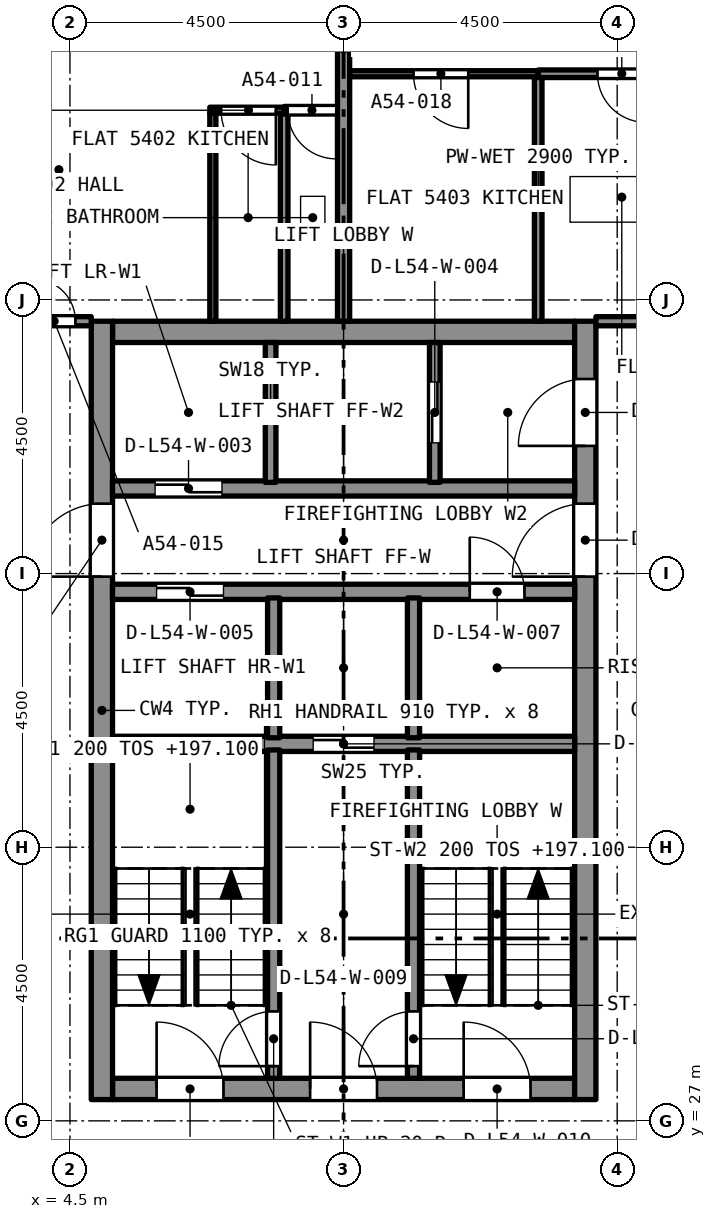
"""IFC4 building model, lengths in metres.
Left out: names, types, materials, properties, quantities, classifications, styles, units other than length and angle.
Written with IfcOpenShell. Run it as: python <this file> out.ifc"""

import sys

from ifc_helpers import new_model, si_unit, direction, frame, frame_2d, origin, place, context, subcontext, project, spatial, rectangle, extrude, element, fill, save


model = new_model("IFC4")
c1 = context("Model", 3, precision=1e-05, world=origin(), true_north=direction((0.0, 1.0)))
c2 = subcontext(c1, "Body", "Model", "MODEL_VIEW")
j1 = project(units=[si_unit("LENGTHUNIT", "METRE"), si_unit("PLANEANGLEUNIT", "RADIAN")], contexts=[c1])
p1 = place(None, origin())
s1 = spatial("IfcSite", under=j1, at=p1, CompositionType="ELEMENT")
p2 = place(p1, origin())
s2 = spatial("IfcBuilding", under=s1, at=p2, CompositionType="ELEMENT")
p3 = place(p2, frame((0.0, 0.0, 195.5)))
s3 = spatial("IfcBuildingStorey", under=s2, at=p3, CompositionType="ELEMENT", Elevation=195.5)
p4 = place(p3, frame((5.2, 27.525, 0.0), z_axis=(0.0, 0.0, 1.0), x_axis=(1.0, 0.0, 0.0)))
e1 = element("IfcWall", 1, at=p4, inside=s3, PredefinedType="SOLIDWALL", context=c2, shape_type="SweptSolid", body=[
    extrude(rectangle(XDim=7.6, YDim=0.35, at=frame_2d((3.8, 0.0))), origin(), (0.0, 0.0, 1.0), 3.2),
])
p5 = place(p4, frame((0.725, 0.0, 0.0)))
e2 = element("IfcOpeningElement", 2, at=p5, cuts=e1, PredefinedType="OPENING", context=c2, shape_type="SweptSolid", body=[
    extrude(rectangle(XDim=1.1, YDim=2.1, at=frame_2d((0.55, 1.05))), frame((0.0, 0.185, 0.0), z_axis=(0.0, -1.0, 0.0), x_axis=(1.0, 0.0, 0.0)), (0.0, 0.0, 1.0), 0.37),
])
p6 = place(p4, frame((3.25, 0.0, 0.0)))
e3 = element("IfcOpeningElement", 3, at=p6, cuts=e1, PredefinedType="OPENING", context=c2, shape_type="SweptSolid", body=[
    extrude(rectangle(XDim=1.1, YDim=2.1, at=frame_2d((0.55, 1.05))), frame((0.0, 0.185, 0.0), z_axis=(0.0, -1.0, 0.0), x_axis=(1.0, 0.0, 0.0)), (0.0, 0.0, 1.0), 0.37),
])
p7 = place(p4, frame((5.775, 0.0, 0.0)))
e4 = element("IfcOpeningElement", 4, at=p7, cuts=e1, PredefinedType="OPENING", context=c2, shape_type="SweptSolid", body=[
    extrude(rectangle(XDim=1.1, YDim=2.1, at=frame_2d((0.55, 1.05))), frame((0.0, 0.185, 0.0), z_axis=(0.0, -1.0, 0.0), x_axis=(1.0, 0.0, 0.0)), (0.0, 0.0, 1.0), 0.37),
])
p8 = place(p3, frame((5.2, 39.975, 0.0), z_axis=(0.0, 0.0, 1.0), x_axis=(1.0, 0.0, 0.0)))
e5 = element("IfcWall", 5, at=p8, inside=s3, PredefinedType="SOLIDWALL", context=c2, shape_type="SweptSolid", body=[
    extrude(rectangle(XDim=7.6, YDim=0.35, at=frame_2d((3.8, 0.0))), origin(), (0.0, 0.0, 1.0), 3.2),
])
p9 = place(p3, frame((5.025, 27.35, 0.0), z_axis=(0.0, 0.0, 1.0), x_axis=(0.0, 1.0, 0.0)))
e6 = element("IfcWall", 6, at=p9, inside=s3, PredefinedType="SOLIDWALL", context=c2, shape_type="SweptSolid", body=[
    extrude(rectangle(XDim=12.8, YDim=0.35, at=frame_2d((6.4, 0.0))), origin(), (0.0, 0.0, 1.0), 3.2),
])
p10 = place(p9, frame((8.6, 0.0, 0.0)))
e7 = element("IfcOpeningElement", 7, at=p10, cuts=e6, PredefinedType="OPENING", context=c2, shape_type="SweptSolid", body=[
    extrude(rectangle(XDim=1.2, YDim=2.1, at=frame_2d((0.6, 1.05))), frame((0.0, 0.185, 0.0), z_axis=(0.0, -1.0, 0.0), x_axis=(1.0, 0.0, 0.0)), (0.0, 0.0, 1.0), 0.37),
])
p11 = place(p3, frame((12.975, 27.35, 0.0), z_axis=(0.0, 0.0, 1.0), x_axis=(0.0, 1.0, 0.0)))
e8 = element("IfcWall", 8, at=p11, inside=s3, PredefinedType="SOLIDWALL", context=c2, shape_type="SweptSolid", body=[
    extrude(rectangle(XDim=12.8, YDim=0.35, at=frame_2d((6.4, 0.0))), origin(), (0.0, 0.0, 1.0), 3.2),
])
p12 = place(p11, frame((10.75, 0.0, 0.0)))
e9 = element("IfcOpeningElement", 9, at=p12, cuts=e8, PredefinedType="OPENING", context=c2, shape_type="SweptSolid", body=[
    extrude(rectangle(XDim=1.1, YDim=2.1, at=frame_2d((0.55, 1.05))), frame((0.0, 0.185, 0.0), z_axis=(0.0, -1.0, 0.0), x_axis=(1.0, 0.0, 0.0)), (0.0, 0.0, 1.0), 0.37),
])
p13 = place(p11, frame((8.6, 0.0, 0.0)))
e10 = element("IfcOpeningElement", 10, at=p13, cuts=e8, PredefinedType="OPENING", context=c2, shape_type="SweptSolid", body=[
    extrude(rectangle(XDim=1.2, YDim=2.1, at=frame_2d((0.6, 1.05))), frame((0.0, 0.185, 0.0), z_axis=(0.0, -1.0, 0.0), x_axis=(1.0, 0.0, 0.0)), (0.0, 0.0, 1.0), 0.37),
])
p14 = place(p3, frame((8.9, 43.62, 0.0), z_axis=(0.0, 0.0, 1.0), x_axis=(-1.0, 0.0, 0.0)))
e11 = element("IfcWall", 11, at=p14, inside=s3, PredefinedType="PARTITIONING", context=c2, shape_type="SweptSolid", body=[
    extrude(rectangle(XDim=0.877, YDim=0.125, at=frame_2d((0.438, 0.0))), origin(), (0.0, 0.0, 1.0), 2.9),
])
p15 = place(p14, frame((0.02, 0.0, 0.0)))
e12 = element("IfcOpeningElement", 12, at=p15, cuts=e11, PredefinedType="OPENING", context=c2, shape_type="SweptSolid", body=[
    extrude(rectangle(XDim=0.8, YDim=2.1, at=frame_2d((0.4, 1.05))), frame((0.0, 0.073, 0.0), z_axis=(0.0, -1.0, 0.0), x_axis=(1.0, 0.0, 0.0)), (0.0, 0.0, 1.0), 0.145),
])
p16 = place(p3, frame((8.023, 40.15, 0.0), z_axis=(0.0, 0.0, 1.0), x_axis=(0.0, 1.0, 0.0)))
e13 = element("IfcWall", 13, at=p16, inside=s3, PredefinedType="PARTITIONING", context=c2, shape_type="SweptSolid", body=[
    extrude(rectangle(XDim=3.408, YDim=0.125, at=frame_2d((1.704, 0.0))), origin(), (0.0, 0.0, 1.0), 2.9),
])
p17 = place(p3, frame((9.0, 40.15, 0.0), z_axis=(0.0, 0.0, 1.0), x_axis=(0.0, 1.0, 0.0)))
e14 = element("IfcWall", 14, at=p17, inside=s3, PredefinedType="PARTITIONING", context=c2, shape_type="SweptSolid", body=[
    extrude(rectangle(XDim=8.95, YDim=0.2, at=frame_2d((4.475, 0.0))), origin(), (0.0, 0.0, 1.0), 2.9),
])
p18 = place(p3, frame((8.023, 43.62, 0.0), z_axis=(0.0, 0.0, 1.0), x_axis=(-1.0, 0.0, 0.0)))
e15 = element("IfcWall", 15, at=p18, inside=s3, PredefinedType="PARTITIONING", context=c2, shape_type="SweptSolid", body=[
    extrude(rectangle(XDim=1.223, YDim=0.1, at=frame_2d((0.611, 0.0))), origin(), (0.0, 0.0, 1.0), 2.9),
])
p19 = place(p18, frame((0.136, 0.0, 0.0)))
e16 = element("IfcOpeningElement", 16, at=p19, cuts=e15, PredefinedType="OPENING", context=c2, shape_type="SweptSolid", body=[
    extrude(rectangle(XDim=0.9, YDim=2.1, at=frame_2d((0.45, 1.05))), frame((0.0, 0.06, 0.0), z_axis=(0.0, -1.0, 0.0), x_axis=(1.0, 0.0, 0.0)), (0.0, 0.0, 1.0), 0.12),
])
p20 = place(p3, frame((6.85, 40.15, 0.0), z_axis=(0.0, 0.0, 1.0), x_axis=(0.0, 1.0, 0.0)))
e17 = element("IfcWall", 17, at=p20, inside=s3, PredefinedType="PARTITIONING", context=c2, shape_type="SweptSolid", body=[
    extrude(rectangle(XDim=3.42, YDim=0.1, at=frame_2d((1.71, 0.0))), origin(), (0.0, 0.0, 1.0), 2.9),
])
p21 = place(p3, frame((3.65, 40.15, 0.0), z_axis=(0.0, 0.0, 1.0), x_axis=(1.0, 0.0, 0.0)))
e18 = element("IfcWall", 18, at=p21, inside=s3, PredefinedType="PARTITIONING", context=c2, shape_type="SweptSolid", body=[
    extrude(rectangle(XDim=1.2, YDim=0.15, at=frame_2d((0.6, 0.0))), origin(), (0.0, 0.0, 1.0), 2.9),
])
p22 = place(p21, frame((0.24, 0.0, 0.0)))
e19 = element("IfcOpeningElement", 19, at=p22, cuts=e18, PredefinedType="OPENING", context=c2, shape_type="SweptSolid", body=[
    extrude(rectangle(XDim=0.7, YDim=2.1, at=frame_2d((0.35, 1.05))), frame((0.0, 0.085, 0.0), z_axis=(0.0, -1.0, 0.0), x_axis=(1.0, 0.0, 0.0)), (0.0, 0.0, 1.0), 0.17),
])
p23 = place(p3, frame((15.012, 44.22, 0.0), z_axis=(0.0, 0.0, 1.0), x_axis=(-1.0, 0.0, 0.0)))
e20 = element("IfcWall", 20, at=p23, inside=s3, PredefinedType="PARTITIONING", context=c2, shape_type="SweptSolid", body=[
    extrude(rectangle(XDim=2.812, YDim=0.125, at=frame_2d((1.406, 0.0))), origin(), (0.0, 0.0, 1.0), 2.9),
])
p24 = place(p23, frame((1.037, 0.0, 0.0)))
e21 = element("IfcOpeningElement", 21, at=p24, cuts=e20, PredefinedType="OPENING", context=c2, shape_type="SweptSolid", body=[
    extrude(rectangle(XDim=0.8, YDim=2.1, at=frame_2d((0.4, 1.05))), frame((0.0, 0.073, 0.0), z_axis=(0.0, -1.0, 0.0), x_axis=(1.0, 0.0, 0.0)), (0.0, 0.0, 1.0), 0.145),
])
p25 = place(p3, frame((12.201, 40.15, 0.0), z_axis=(0.0, 0.0, 1.0), x_axis=(0.0, 1.0, 0.0)))
e22 = element("IfcWall", 22, at=p25, inside=s3, PredefinedType="PARTITIONING", context=c2, shape_type="SweptSolid", body=[
    extrude(rectangle(XDim=4.008, YDim=0.125, at=frame_2d((2.004, 0.0))), origin(), (0.0, 0.0, 1.0), 2.9),
])
p26 = place(p3, frame((13.15, 40.15, 0.0), z_axis=(0.0, 0.0, 1.0), x_axis=(1.0, 0.0, 0.0)))
e23 = element("IfcWall", 23, at=p26, inside=s3, PredefinedType="PARTITIONING", context=c2, shape_type="SweptSolid", body=[
    extrude(rectangle(XDim=1.8, YDim=0.15, at=frame_2d((0.9, 0.0))), origin(), (0.0, 0.0, 1.0), 2.9),
])
p27 = place(p3, frame((12.201, 44.22, 0.0), z_axis=(0.0, 0.0, 1.0), x_axis=(-1.0, 0.0, 0.0)))
e24 = element("IfcWall", 24, at=p27, inside=s3, PredefinedType="PARTITIONING", context=c2, shape_type="SweptSolid", body=[
    extrude(rectangle(XDim=3.101, YDim=0.1, at=frame_2d((1.55, 0.0))), origin(), (0.0, 0.0, 1.0), 2.9),
])
p28 = place(p27, frame((1.15, 0.0, 0.0)))
e25 = element("IfcOpeningElement", 25, at=p28, cuts=e24, PredefinedType="OPENING", context=c2, shape_type="SweptSolid", body=[
    extrude(rectangle(XDim=0.9, YDim=2.1, at=frame_2d((0.45, 1.05))), frame((0.0, 0.06, 0.0), z_axis=(0.0, -1.0, 0.0), x_axis=(1.0, 0.0, 0.0)), (0.0, 0.0, 1.0), 0.12),
])
p29 = place(p3, frame((5.2, 33.2, 0.0), z_axis=(0.0, 0.0, 1.0), x_axis=(1.0, 0.0, 0.0)))
e26 = element("IfcWall", 26, at=p29, inside=s3, PredefinedType="SOLIDWALL", context=c2, shape_type="SweptSolid", body=[
    extrude(rectangle(XDim=7.6, YDim=0.25, at=frame_2d((3.8, 0.0))), origin(), (0.0, 0.0, 1.0), 2.9),
])
p30 = place(p29, frame((3.3, 0.0, 0.0)))
e27 = element("IfcOpeningElement", 27, at=p30, cuts=e26, PredefinedType="OPENING", context=c2, shape_type="SweptSolid", body=[
    extrude(rectangle(XDim=1.0, YDim=2.1, at=frame_2d((0.5, 1.05))), frame((0.0, 0.135, 0.0), z_axis=(0.0, -1.0, 0.0), x_axis=(1.0, 0.0, 0.0)), (0.0, 0.0, 1.0), 0.27),
])
p31 = place(p3, frame((5.2, 35.7, 0.0), z_axis=(0.0, 0.0, 1.0), x_axis=(1.0, 0.0, 0.0)))
e28 = element("IfcWall", 28, at=p31, inside=s3, PredefinedType="SOLIDWALL", context=c2, shape_type="SweptSolid", body=[
    extrude(rectangle(XDim=7.6, YDim=0.25, at=frame_2d((3.8, 0.0))), origin(), (0.0, 0.0, 1.0), 2.9),
])
p32 = place(p31, frame((0.725, 0.0, 0.0)))
e29 = element("IfcOpeningElement", 29, at=p32, cuts=e28, PredefinedType="OPENING", context=c2, shape_type="SweptSolid", body=[
    extrude(rectangle(XDim=1.1, YDim=2.4, at=frame_2d((0.55, 1.2))), frame((0.0, 0.135, 0.0), z_axis=(0.0, -1.0, 0.0), x_axis=(1.0, 0.0, 0.0)), (0.0, 0.0, 1.0), 0.27),
])
p33 = place(p31, frame((5.875, 0.0, 0.0)))
e30 = element("IfcOpeningElement", 30, at=p33, cuts=e28, PredefinedType="OPENING", context=c2, shape_type="SweptSolid", body=[
    extrude(rectangle(XDim=0.9, YDim=2.1, at=frame_2d((0.45, 1.05))), frame((0.0, 0.135, 0.0), z_axis=(0.0, -1.0, 0.0), x_axis=(1.0, 0.0, 0.0)), (0.0, 0.0, 1.0), 0.27),
])
p34 = place(p3, frame((5.2, 37.4, 0.0), z_axis=(0.0, 0.0, 1.0), x_axis=(1.0, 0.0, 0.0)))
e31 = element("IfcWall", 31, at=p34, inside=s3, PredefinedType="SOLIDWALL", context=c2, shape_type="SweptSolid", body=[
    extrude(rectangle(XDim=7.6, YDim=0.25, at=frame_2d((3.8, 0.0))), origin(), (0.0, 0.0, 1.0), 2.9),
])
p35 = place(p34, frame((0.7, 0.0, 0.0)))
e32 = element("IfcOpeningElement", 32, at=p35, cuts=e31, PredefinedType="OPENING", context=c2, shape_type="SweptSolid", body=[
    extrude(rectangle(XDim=1.1, YDim=2.4, at=frame_2d((0.55, 1.2))), frame((0.0, 0.135, 0.0), z_axis=(0.0, -1.0, 0.0), x_axis=(1.0, 0.0, 0.0)), (0.0, 0.0, 1.0), 0.27),
])
p36 = place(p3, frame((7.85, 27.7, 0.0), z_axis=(0.0, 0.0, 1.0), x_axis=(0.0, 1.0, 0.0)))
e33 = element("IfcWall", 33, at=p36, inside=s3, PredefinedType="SOLIDWALL", context=c2, shape_type="SweptSolid", body=[
    extrude(rectangle(XDim=5.4, YDim=0.2, at=frame_2d((2.7, 0.0))), origin(), (0.0, 0.0, 1.0), 2.9),
])
p37 = place(p36, frame((0.2, 0.0, 0.0)))
e34 = element("IfcOpeningElement", 34, at=p37, cuts=e33, PredefinedType="OPENING", context=c2, shape_type="SweptSolid", body=[
    extrude(rectangle(XDim=0.9, YDim=2.1, at=frame_2d((0.45, 1.05))), frame((0.0, 0.11, 0.0), z_axis=(0.0, -1.0, 0.0), x_axis=(1.0, 0.0, 0.0)), (0.0, 0.0, 1.0), 0.22),
])
p38 = place(p3, frame((10.15, 27.7, 0.0), z_axis=(0.0, 0.0, 1.0), x_axis=(0.0, 1.0, 0.0)))
e35 = element("IfcWall", 35, at=p38, inside=s3, PredefinedType="SOLIDWALL", context=c2, shape_type="SweptSolid", body=[
    extrude(rectangle(XDim=5.4, YDim=0.2, at=frame_2d((2.7, 0.0))), origin(), (0.0, 0.0, 1.0), 2.9),
])
p39 = place(p38, frame((0.2, 0.0, 0.0)))
e36 = element("IfcOpeningElement", 36, at=p39, cuts=e35, PredefinedType="OPENING", context=c2, shape_type="SweptSolid", body=[
    extrude(rectangle(XDim=0.9, YDim=2.1, at=frame_2d((0.45, 1.05))), frame((0.0, 0.11, 0.0), z_axis=(0.0, -1.0, 0.0), x_axis=(1.0, 0.0, 0.0)), (0.0, 0.0, 1.0), 0.22),
])
for number, where, z_axis, x_axis in (
    (37, (7.85, 33.3, 0.0), (0.0, 0.0, 1.0), (0.0, 1.0, 0.0)),
    (38, (10.15, 33.3, 0.0), (0.0, 0.0, 1.0), (0.0, 1.0, 0.0)),
):
    element("IfcWall", number, at=place(p3, frame(where, z_axis=z_axis, x_axis=x_axis)), inside=s3, PredefinedType="SOLIDWALL", context=c2, shape_type="SweptSolid", body=[
        extrude(rectangle(XDim=2.3, YDim=0.2, at=frame_2d((1.15, 0.0))), origin(), (0.0, 0.0, 1.0), 2.9),
    ])
p40 = place(p3, frame((7.8, 37.5, 0.0), z_axis=(0.0, 0.0, 1.0), x_axis=(0.0, 1.0, 0.0)))
e39 = element("IfcWall", 39, at=p40, inside=s3, PredefinedType="SOLIDWALL", context=c2, shape_type="SweptSolid", body=[
    extrude(rectangle(XDim=2.3, YDim=0.175, at=frame_2d((1.15, 0.0))), origin(), (0.0, 0.0, 1.0), 2.9),
])
p41 = place(p3, frame((10.5, 37.5, 0.0), z_axis=(0.0, 0.0, 1.0), x_axis=(0.0, 1.0, 0.0)))
e40 = element("IfcWall", 40, at=p41, inside=s3, PredefinedType="SOLIDWALL", context=c2, shape_type="SweptSolid", body=[
    extrude(rectangle(XDim=2.3, YDim=0.175, at=frame_2d((1.15, 0.0))), origin(), (0.0, 0.0, 1.0), 2.9),
])
p42 = place(p41, frame((0.65, 0.0, 0.0)))
e41 = element("IfcOpeningElement", 41, at=p42, cuts=e40, PredefinedType="OPENING", context=c2, shape_type="SweptSolid", body=[
    extrude(rectangle(XDim=1.0, YDim=2.1, at=frame_2d((0.5, 1.05))), frame((0.0, 0.097, 0.0), z_axis=(0.0, -1.0, 0.0), x_axis=(1.0, 0.0, 0.0)), (0.0, 0.0, 1.0), 0.195),
])
p43 = place(p15, origin())
e42 = element("IfcDoor", 42, at=p43, inside=s3, OperationType="SINGLE_SWING_LEFT", PredefinedType="DOOR", context=c2, shape_type="SweptSolid", body=[
    extrude(rectangle(XDim=0.8, YDim=2.1, at=frame_2d((0.4, 1.05))), frame((0.0, 0.025, 0.0), z_axis=(0.0, -1.0, 0.0), x_axis=(1.0, 0.0, 0.0)), (0.0, 0.0, 1.0), 0.05),
])
fill(e12, e42)
p44 = place(p19, origin())
e43 = element("IfcDoor", 43, at=p44, inside=s3, OperationType="SINGLE_SWING_LEFT", PredefinedType="DOOR", context=c2, shape_type="SweptSolid", body=[
    extrude(rectangle(XDim=0.9, YDim=2.1, at=frame_2d((0.45, 1.05))), frame((0.0, 0.025, 0.0), z_axis=(0.0, -1.0, 0.0), x_axis=(1.0, 0.0, 0.0)), (0.0, 0.0, 1.0), 0.05),
])
fill(e16, e43)
p45 = place(p22, origin())
e44 = element("IfcDoor", 44, at=p45, inside=s3, OperationType="SINGLE_SWING_LEFT", PredefinedType="DOOR", context=c2, shape_type="SweptSolid", body=[
    extrude(rectangle(XDim=0.7, YDim=2.1, at=frame_2d((0.35, 1.05))), frame((0.0, 0.025, 0.0), z_axis=(0.0, -1.0, 0.0), x_axis=(1.0, 0.0, 0.0)), (0.0, 0.0, 1.0), 0.05),
])
fill(e19, e44)
p46 = place(p24, origin())
e45 = element("IfcDoor", 45, at=p46, inside=s3, OperationType="SINGLE_SWING_RIGHT", PredefinedType="DOOR", context=c2, shape_type="SweptSolid", body=[
    extrude(rectangle(XDim=0.8, YDim=2.1, at=frame_2d((0.4, 1.05))), frame((0.0, 0.025, 0.0), z_axis=(0.0, -1.0, 0.0), x_axis=(1.0, 0.0, 0.0)), (0.0, 0.0, 1.0), 0.05),
])
fill(e21, e45)
p47 = place(p28, origin())
e46 = element("IfcDoor", 46, at=p47, inside=s3, OperationType="SINGLE_SWING_RIGHT", PredefinedType="DOOR", context=c2, shape_type="SweptSolid", body=[
    extrude(rectangle(XDim=0.9, YDim=2.1, at=frame_2d((0.45, 1.05))), frame((0.0, 0.025, 0.0), z_axis=(0.0, -1.0, 0.0), x_axis=(1.0, 0.0, 0.0)), (0.0, 0.0, 1.0), 0.05),
])
fill(e25, e46)
p48 = place(p37, origin())
e47 = element("IfcDoor", 47, at=p48, inside=s3, OperationType="SINGLE_SWING_LEFT", PredefinedType="DOOR", context=c2, shape_type="SweptSolid", body=[
    extrude(rectangle(XDim=0.9, YDim=2.1, at=frame_2d((0.45, 1.05))), frame((0.0, 0.025, 0.0), z_axis=(0.0, -1.0, 0.0), x_axis=(1.0, 0.0, 0.0)), (0.0, 0.0, 1.0), 0.05),
])
fill(e34, e47)
p49 = place(p39, origin())
e48 = element("IfcDoor", 48, at=p49, inside=s3, OperationType="SINGLE_SWING_LEFT", PredefinedType="DOOR", context=c2, shape_type="SweptSolid", body=[
    extrude(rectangle(XDim=0.9, YDim=2.1, at=frame_2d((0.45, 1.05))), frame((0.0, 0.025, 0.0), z_axis=(0.0, -1.0, 0.0), x_axis=(1.0, 0.0, 0.0)), (0.0, 0.0, 1.0), 0.05),
])
fill(e36, e48)
p50 = place(p35, origin())
e49 = element("IfcDoor", 49, at=p50, inside=s3, OperationType="SLIDING_TO_LEFT", PredefinedType="DOOR", context=c2, shape_type="SweptSolid", body=[
    extrude(rectangle(XDim=1.1, YDim=2.4, at=frame_2d((0.55, 1.2))), frame((0.0, 0.025, 0.0), z_axis=(0.0, -1.0, 0.0), x_axis=(1.0, 0.0, 0.0)), (0.0, 0.0, 1.0), 0.05),
])
fill(e32, e49)
p51 = place(p42, origin())
e50 = element("IfcDoor", 50, at=p51, inside=s3, OperationType="SLIDING_TO_LEFT", PredefinedType="DOOR", context=c2, shape_type="SweptSolid", body=[
    extrude(rectangle(XDim=1.0, YDim=2.1, at=frame_2d((0.5, 1.05))), frame((0.0, 0.025, 0.0), z_axis=(0.0, -1.0, 0.0), x_axis=(1.0, 0.0, 0.0)), (0.0, 0.0, 1.0), 0.05),
])
fill(e41, e50)
p52 = place(p32, origin())
e51 = element("IfcDoor", 51, at=p52, inside=s3, OperationType="SLIDING_TO_LEFT", PredefinedType="DOOR", context=c2, shape_type="SweptSolid", body=[
    extrude(rectangle(XDim=1.1, YDim=2.4, at=frame_2d((0.55, 1.2))), frame((0.0, 0.025, 0.0), z_axis=(0.0, -1.0, 0.0), x_axis=(1.0, 0.0, 0.0)), (0.0, 0.0, 1.0), 0.05),
])
fill(e29, e51)
p53 = place(p30, origin())
e52 = element("IfcDoor", 52, at=p53, inside=s3, OperationType="SLIDING_TO_LEFT", PredefinedType="DOOR", context=c2, shape_type="SweptSolid", body=[
    extrude(rectangle(XDim=1.0, YDim=2.1, at=frame_2d((0.5, 1.05))), frame((0.0, 0.025, 0.0), z_axis=(0.0, -1.0, 0.0), x_axis=(1.0, 0.0, 0.0)), (0.0, 0.0, 1.0), 0.05),
])
fill(e27, e52)
p54 = place(p33, origin())
e53 = element("IfcDoor", 53, at=p54, inside=s3, OperationType="SINGLE_SWING_LEFT", PredefinedType="DOOR", context=c2, shape_type="SweptSolid", body=[
    extrude(rectangle(XDim=0.9, YDim=2.1, at=frame_2d((0.45, 1.05))), frame((0.0, 0.025, 0.0), z_axis=(0.0, -1.0, 0.0), x_axis=(1.0, 0.0, 0.0)), (0.0, 0.0, 1.0), 0.05),
])
fill(e30, e53)
p55 = place(p5, origin())
e54 = element("IfcDoor", 54, at=p55, inside=s3, OperationType="SINGLE_SWING_LEFT", PredefinedType="DOOR", context=c2, shape_type="SweptSolid", body=[
    extrude(rectangle(XDim=1.1, YDim=2.1, at=frame_2d((0.55, 1.05))), frame((0.0, 0.025, 0.0), z_axis=(0.0, -1.0, 0.0), x_axis=(1.0, 0.0, 0.0)), (0.0, 0.0, 1.0), 0.05),
])
fill(e2, e54)
p56 = place(p6, origin())
e55 = element("IfcDoor", 55, at=p56, inside=s3, OperationType="SINGLE_SWING_LEFT", PredefinedType="DOOR", context=c2, shape_type="SweptSolid", body=[
    extrude(rectangle(XDim=1.1, YDim=2.1, at=frame_2d((0.55, 1.05))), frame((0.0, 0.025, 0.0), z_axis=(0.0, -1.0, 0.0), x_axis=(1.0, 0.0, 0.0)), (0.0, 0.0, 1.0), 0.05),
])
fill(e3, e55)
p57 = place(p7, origin())
e56 = element("IfcDoor", 56, at=p57, inside=s3, OperationType="SINGLE_SWING_LEFT", PredefinedType="DOOR", context=c2, shape_type="SweptSolid", body=[
    extrude(rectangle(XDim=1.1, YDim=2.1, at=frame_2d((0.55, 1.05))), frame((0.0, 0.025, 0.0), z_axis=(0.0, -1.0, 0.0), x_axis=(1.0, 0.0, 0.0)), (0.0, 0.0, 1.0), 0.05),
])
fill(e4, e56)
p58 = place(p12, origin())
e57 = element("IfcDoor", 57, at=p58, inside=s3, OperationType="SINGLE_SWING_LEFT", PredefinedType="DOOR", context=c2, shape_type="SweptSolid", body=[
    extrude(rectangle(XDim=1.1, YDim=2.1, at=frame_2d((0.55, 1.05))), frame((0.0, 0.025, 0.0), z_axis=(0.0, -1.0, 0.0), x_axis=(1.0, 0.0, 0.0)), (0.0, 0.0, 1.0), 0.05),
])
fill(e9, e57)
p59 = place(p10, origin())
e58 = element("IfcDoor", 58, at=p59, inside=s3, OperationType="SINGLE_SWING_LEFT", PredefinedType="DOOR", context=c2, shape_type="SweptSolid", body=[
    extrude(rectangle(XDim=1.2, YDim=2.1, at=frame_2d((0.6, 1.05))), frame((0.0, 0.025, 0.0), z_axis=(0.0, -1.0, 0.0), x_axis=(1.0, 0.0, 0.0)), (0.0, 0.0, 1.0), 0.05),
])
fill(e7, e58)
p60 = place(p13, origin())
e59 = element("IfcDoor", 59, at=p60, inside=s3, OperationType="SINGLE_SWING_LEFT", PredefinedType="DOOR", context=c2, shape_type="SweptSolid", body=[
    extrude(rectangle(XDim=1.2, YDim=2.1, at=frame_2d((0.6, 1.05))), frame((0.0, 0.025, 0.0), z_axis=(0.0, -1.0, 0.0), x_axis=(1.0, 0.0, 0.0)), (0.0, 0.0, 1.0), 0.05),
])
fill(e10, e59)
save(model, sys.argv[1])
